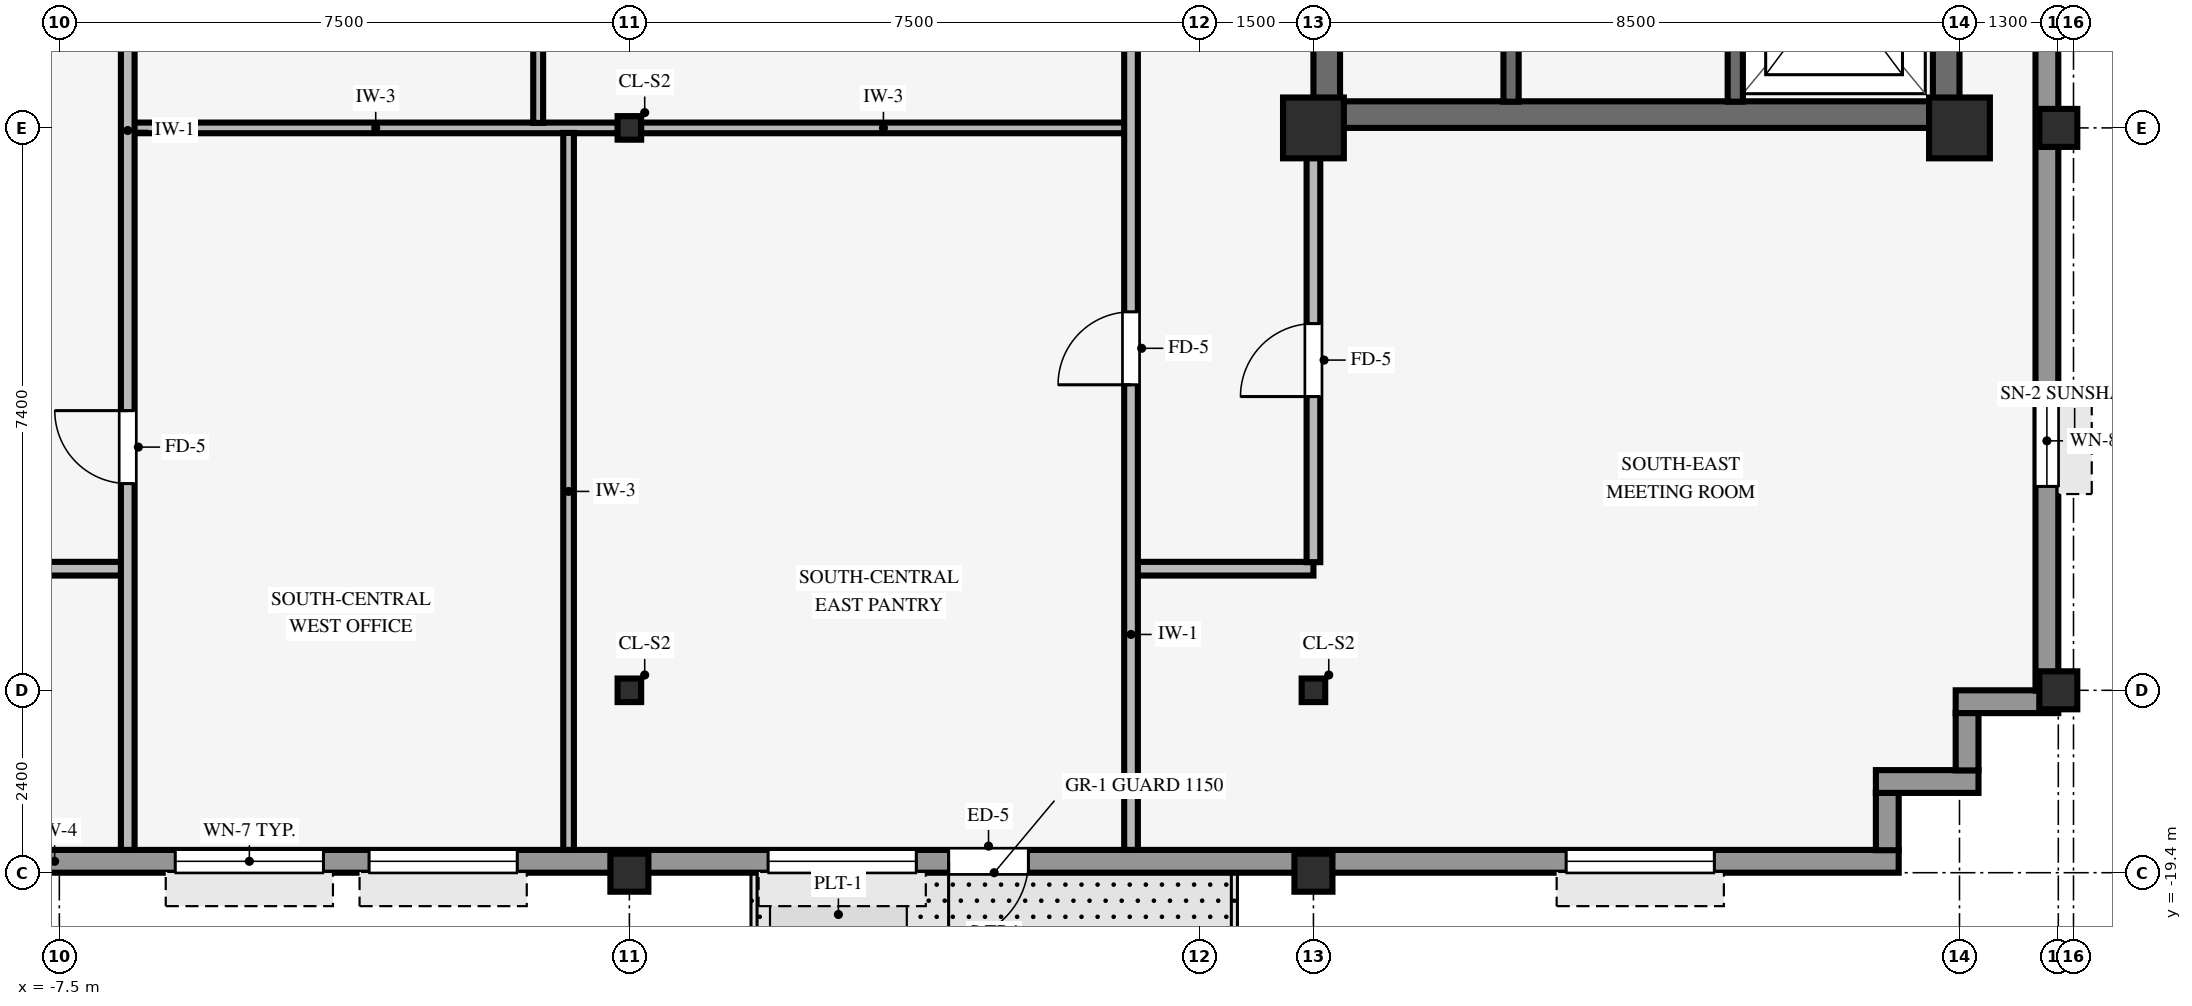
"""IFC4 building model, lengths in metres.
Left out: names, types, materials, properties, quantities, classifications, styles, units other than length and angle.
Written with IfcOpenShell. Run it as: python <this file> out.ifc"""

import sys

from ifc_helpers import new_model, si_unit, direction, frame, frame_2d, origin, origin_2d, place, context, subcontext, project, spatial, rectangle, hollow_rectangle, i_section, extrude, source, transform, mapped, element, fill, save


model = new_model("IFC4")
c1 = context("Model", 3, precision=1e-05, world=origin(), true_north=direction((0.0, 1.0)))
c2 = subcontext(c1, "Body", "Model", "MODEL_VIEW")
j1 = project(units=[si_unit("LENGTHUNIT", "METRE"), si_unit("PLANEANGLEUNIT", "RADIAN")], contexts=[c1])
p1 = place(None, origin())
s1 = spatial("IfcSite", under=j1, at=p1, CompositionType="ELEMENT")
p2 = place(p1, origin())
s2 = spatial("IfcBuilding", under=s1, at=p2, CompositionType="ELEMENT")
p3 = place(p2, frame((0.0, 0.0, 257.95)))
s3 = spatial("IfcBuildingStorey", under=s2, at=p3, CompositionType="ELEMENT", Elevation=257.95)
p4 = place(p3, frame((9.0, -9.425, 0.0), z_axis=(0.0, 0.0, 1.0), x_axis=(1.0, 0.0, 0.0)))
e1 = element("IfcWall", 1, at=p4, inside=s3, PredefinedType="SHEAR", context=c2, shape_type="SweptSolid", body=[
    extrude(rectangle(XDim=8.5, YDim=0.35, at=frame_2d((4.25, 0.0))), origin(), (0.0, 0.0, 1.0), 3.37),
])
p5 = place(p3, frame((9.175, -9.255, 0.0), z_axis=(0.0, 0.0, 1.0), x_axis=(0.0, 1.0, 0.0)))
e2 = element("IfcWall", 2, at=p5, inside=s3, PredefinedType="SHEAR", context=c2, shape_type="SweptSolid", body=[
    extrude(rectangle(XDim=18.51, YDim=0.35, at=frame_2d((9.255, 0.0))), origin(), (0.0, 0.0, 1.0), 3.37),
])
p6 = place(p5, frame((8.655, 0.0, 0.0)))
e3 = element("IfcOpeningElement", 3, at=p6, cuts=e2, PredefinedType="OPENING", context=c2, shape_type="SweptSolid", body=[
    extrude(rectangle(XDim=1.2, YDim=2.15, at=frame_2d((0.6, 1.075))), frame((0.0, 0.185, 0.0), z_axis=(0.0, -1.0, 0.0), x_axis=(1.0, 0.0, 0.0)), (0.0, 0.0, 1.0), 0.37),
])
p7 = place(p3, frame((17.325, -9.255, 0.0), z_axis=(0.0, 0.0, 1.0), x_axis=(0.0, 1.0, 0.0)))
e4 = element("IfcWall", 4, at=p7, inside=s3, PredefinedType="SHEAR", context=c2, shape_type="SweptSolid", body=[
    extrude(rectangle(XDim=18.51, YDim=0.35, at=frame_2d((9.255, 0.0))), origin(), (0.0, 0.0, 1.0), 3.37),
])
for number, where, z_axis, x_axis in (
    (5, (9.0, -9.6, 0.0), (0.0, 0.0, 1.0), (1.0, 0.0, 0.0)),
    (6, (17.5, -9.6, 0.0), (0.0, 0.0, 1.0), (1.0, 0.0, 0.0)),
):
    element("IfcColumn", number, at=place(p3, frame(where, z_axis=z_axis, x_axis=x_axis)), inside=s3, PredefinedType="COLUMN", context=c2, shape_type="SweptSolid", body=[
        extrude(rectangle(XDim=0.8, YDim=0.8, at=origin_2d()), origin(), (0.0, 0.0, 1.0), 3.37),
    ])
for number, where, z_axis, x_axis in (
    (7, (18.8, -17.0, 0.0), (0.0, 0.0, 1.0), (1.0, 0.0, 0.0)),
    (8, (18.8, -9.6, 0.0), (0.0, 0.0, 1.0), (1.0, 0.0, 0.0)),
    (9, (0.0, -19.4, 0.0), (0.0, 0.0, 1.0), (1.0, 0.0, 0.0)),
    (10, (9.0, -19.4, 0.0), (0.0, 0.0, 1.0), (1.0, 0.0, 0.0)),
):
    element("IfcColumn", number, at=place(p3, frame(where, z_axis=z_axis, x_axis=x_axis)), inside=s3, PredefinedType="COLUMN", context=c2, shape_type="SweptSolid", body=[
        extrude(hollow_rectangle(XDim=0.5, YDim=0.5, WallThickness=0.032, InnerFilletRadius=0.032, OuterFilletRadius=0.064, at=origin_2d()), origin(), (0.0, 0.0, 1.0), 3.37),
    ])
for number, where, z_axis, x_axis in (
    (11, (0.0, -17.0, 0.0), (0.0, 0.0, 1.0), (1.0, 0.0, 0.0)),
    (12, (0.0, -9.6, 0.0), (0.0, 0.0, 1.0), (1.0, 0.0, 0.0)),
    (13, (9.0, -17.0, 0.0), (0.0, 0.0, 1.0), (1.0, 0.0, 0.0)),
):
    element("IfcColumn", number, at=place(p3, frame(where, z_axis=z_axis, x_axis=x_axis)), inside=s3, PredefinedType="COLUMN", context=c2, shape_type="SweptSolid", body=[
        extrude(i_section(OverallWidth=0.31, OverallDepth=0.31, WebThickness=0.015, FlangeThickness=0.015, FilletRadius=0.015, at=origin_2d()), origin(), (0.0, 0.0, 1.0), 3.37),
    ])
p8 = place(p3, frame((-18.9, -19.25, 0.0), z_axis=(0.0, 0.0, 1.0), x_axis=(1.0, 0.0, 0.0)))
e14 = element("IfcWall", 14, at=p8, inside=s3, PredefinedType="STANDARD", context=c2, shape_type="SweptSolid", body=[
    extrude(rectangle(XDim=35.6, YDim=0.3, at=frame_2d((17.8, 0.0))), origin(), (0.0, 0.0, 1.0), 2.705),
])
p9 = place(p8, frame((24.15, 0.0, 0.0), z_axis=(0.0, 0.0, 1.0), x_axis=(-1.0, 0.0, 0.0)))
e15 = element("IfcOpeningElement", 15, at=p9, cuts=e14, PredefinedType="OPENING", context=c2, shape_type="SweptSolid", body=[
    extrude(rectangle(XDim=1.05, YDim=2.1, at=frame_2d((0.525, 1.05))), frame((0.0, 0.16, 0.0), z_axis=(0.0, -1.0, 0.0), x_axis=(1.0, 0.0, 0.0)), (0.0, 0.0, 1.0), 0.32),
])
p10 = place(p8, frame((2.425, 0.0, 0.8)))
e16 = element("IfcOpeningElement", 16, at=p10, cuts=e14, PredefinedType="OPENING", context=c2, shape_type="SweptSolid", body=[
    extrude(rectangle(XDim=1.95, YDim=1.48, at=frame_2d((0.975, 0.74))), frame((0.0, 0.16, 0.0), z_axis=(0.0, -1.0, 0.0), x_axis=(1.0, 0.0, 0.0)), (0.0, 0.0, 1.0), 0.32),
])
p11 = place(p8, frame((7.225, 0.0, 0.8)))
e17 = element("IfcOpeningElement", 17, at=p11, cuts=e14, PredefinedType="OPENING", context=c2, shape_type="SweptSolid", body=[
    extrude(rectangle(XDim=1.95, YDim=1.48, at=frame_2d((0.975, 0.74))), frame((0.0, 0.16, 0.0), z_axis=(0.0, -1.0, 0.0), x_axis=(1.0, 0.0, 0.0)), (0.0, 0.0, 1.0), 0.32),
])
p12 = place(p8, frame((12.925, 0.0, 0.8)))
e18 = element("IfcOpeningElement", 18, at=p12, cuts=e14, PredefinedType="OPENING", context=c2, shape_type="SweptSolid", body=[
    extrude(rectangle(XDim=1.95, YDim=1.48, at=frame_2d((0.975, 0.74))), frame((0.0, 0.16, 0.0), z_axis=(0.0, -1.0, 0.0), x_axis=(1.0, 0.0, 0.0)), (0.0, 0.0, 1.0), 0.32),
])
p13 = place(p8, frame((15.475, 0.0, 0.8)))
e19 = element("IfcOpeningElement", 19, at=p13, cuts=e14, PredefinedType="OPENING", context=c2, shape_type="SweptSolid", body=[
    extrude(rectangle(XDim=1.95, YDim=1.48, at=frame_2d((0.975, 0.74))), frame((0.0, 0.16, 0.0), z_axis=(0.0, -1.0, 0.0), x_axis=(1.0, 0.0, 0.0)), (0.0, 0.0, 1.0), 0.32),
])
p14 = place(p8, frame((20.725, 0.0, 0.8)))
e20 = element("IfcOpeningElement", 20, at=p14, cuts=e14, PredefinedType="OPENING", context=c2, shape_type="SweptSolid", body=[
    extrude(rectangle(XDim=1.95, YDim=1.48, at=frame_2d((0.975, 0.74))), frame((0.0, 0.16, 0.0), z_axis=(0.0, -1.0, 0.0), x_axis=(1.0, 0.0, 0.0)), (0.0, 0.0, 1.0), 0.32),
])
p15 = place(p8, frame((31.225, 0.0, 0.8)))
e21 = element("IfcOpeningElement", 21, at=p15, cuts=e14, PredefinedType="OPENING", context=c2, shape_type="SweptSolid", body=[
    extrude(rectangle(XDim=1.95, YDim=1.48, at=frame_2d((0.975, 0.74))), frame((0.0, 0.16, 0.0), z_axis=(0.0, -1.0, 0.0), x_axis=(1.0, 0.0, 0.0)), (0.0, 0.0, 1.0), 0.32),
])
p16 = place(p3, frame((16.55, -19.104, 0.0), z_axis=(0.0, 0.0, 1.0), x_axis=(0.0, 1.0, 0.0)))
e22 = element("IfcWall", 22, at=p16, inside=s3, PredefinedType="STANDARD", context=c2, shape_type="SweptSolid", body=[
    extrude(rectangle(XDim=0.758, YDim=0.3, at=frame_2d((0.379, 0.0))), origin(), (0.0, 0.0, 1.0), 2.892),
])
p17 = place(p3, frame((16.4, -18.2, 0.0), z_axis=(0.0, 0.0, 1.0), x_axis=(1.0, 0.0, 0.0)))
e23 = element("IfcWall", 23, at=p17, inside=s3, PredefinedType="STANDARD", context=c2, shape_type="SweptSolid", body=[
    extrude(rectangle(XDim=1.35, YDim=0.3, at=frame_2d((0.675, 0.0))), origin(), (0.0, 0.0, 1.0), 2.892),
])
p18 = place(p3, frame((17.6, -18.054, 0.0), z_axis=(0.0, 0.0, 1.0), x_axis=(0.0, 1.0, 0.0)))
e24 = element("IfcWall", 24, at=p18, inside=s3, PredefinedType="STANDARD", context=c2, shape_type="SweptSolid", body=[
    extrude(rectangle(XDim=0.758, YDim=0.3, at=frame_2d((0.379, 0.0))), origin(), (0.0, 0.0, 1.0), 2.892),
])
p19 = place(p3, frame((17.45, -17.15, 0.0), z_axis=(0.0, 0.0, 1.0), x_axis=(1.0, 0.0, 0.0)))
e25 = element("IfcWall", 25, at=p19, inside=s3, PredefinedType="STANDARD", context=c2, shape_type="SweptSolid", body=[
    extrude(rectangle(XDim=1.35, YDim=0.3, at=frame_2d((0.675, 0.0))), origin(), (0.0, 0.0, 1.0), 2.892),
])
p20 = place(p3, frame((18.65, -17.004, 0.0), z_axis=(0.0, 0.0, 1.0), x_axis=(0.0, 1.0, 0.0)))
e26 = element("IfcWall", 26, at=p20, inside=s3, PredefinedType="STANDARD", context=c2, shape_type="SweptSolid", body=[
    extrude(rectangle(XDim=34.008, YDim=0.3, at=frame_2d((17.004, 0.0))), origin(), (0.0, 0.0, 1.0), 2.705),
])
p21 = place(p20, frame((2.686, 0.0, 0.8)))
e27 = element("IfcOpeningElement", 27, at=p21, cuts=e26, PredefinedType="OPENING", context=c2, shape_type="SweptSolid", body=[
    extrude(rectangle(XDim=1.2, YDim=1.48, at=frame_2d((0.6, 0.74))), frame((0.0, 0.16, 0.0), z_axis=(0.0, -1.0, 0.0), x_axis=(1.0, 0.0, 0.0)), (0.0, 0.0, 1.0), 0.32),
])
p22 = place(p20, frame((30.122, 0.0, 0.8)))
e28 = element("IfcOpeningElement", 28, at=p22, cuts=e26, PredefinedType="OPENING", context=c2, shape_type="SweptSolid", body=[
    extrude(rectangle(XDim=1.2, YDim=1.48, at=frame_2d((0.6, 0.74))), frame((0.0, 0.16, 0.0), z_axis=(0.0, -1.0, 0.0), x_axis=(1.0, 0.0, 0.0)), (0.0, 0.0, 1.0), 0.32),
])
p23 = place(p3, frame((14.55, -9.255, 0.0), z_axis=(0.0, 0.0, 1.0), x_axis=(0.0, 1.0, 0.0)))
e29 = element("IfcWall", 29, at=p23, inside=s3, PredefinedType="SHEAR", context=c2, shape_type="SweptSolid", body=[
    extrude(rectangle(XDim=10.16, YDim=0.2, at=frame_2d((5.08, 0.0))), origin(), (0.0, 0.0, 1.0), 3.37),
])
p24 = place(p23, frame((6.615, 0.0, 0.0)))
e30 = element("IfcOpeningElement", 30, at=p24, cuts=e29, PredefinedType="OPENING", context=c2, shape_type="SweptSolid", body=[
    extrude(rectangle(XDim=0.88, YDim=2.1, at=frame_2d((0.44, 1.05))), frame((0.0, 0.11, 0.0), z_axis=(0.0, -1.0, 0.0), x_axis=(1.0, 0.0, 0.0)), (0.0, 0.0, 1.0), 0.22),
])
p25 = place(p23, frame((0.98, 0.0, 0.0)))
e31 = element("IfcOpeningElement", 31, at=p25, cuts=e29, PredefinedType="OPENING", context=c2, shape_type="SweptSolid", body=[
    extrude(rectangle(XDim=1.15, YDim=2.15, at=frame_2d((0.575, 1.075))), frame((0.0, 0.11, 0.0), z_axis=(0.0, -1.0, 0.0), x_axis=(1.0, 0.0, 0.0)), (0.0, 0.0, 1.0), 0.22),
])
p26 = place(p3, frame((11.6, -9.255, 0.0), z_axis=(0.0, 0.0, 1.0), x_axis=(0.0, 1.0, 0.0)))
e32 = element("IfcWall", 32, at=p26, inside=s3, PredefinedType="SHEAR", context=c2, shape_type="SweptSolid", body=[
    extrude(rectangle(XDim=8.025, YDim=0.2, at=frame_2d((4.012, 0.0))), origin(), (0.0, 0.0, 1.0), 3.37),
])
p27 = place(p26, frame((5.615, 0.0, 0.0)))
e33 = element("IfcOpeningElement", 33, at=p27, cuts=e32, PredefinedType="OPENING", context=c2, shape_type="SweptSolid", body=[
    extrude(rectangle(XDim=0.88, YDim=2.1, at=frame_2d((0.44, 1.05))), frame((0.0, 0.11, 0.0), z_axis=(0.0, -1.0, 0.0), x_axis=(1.0, 0.0, 0.0)), (0.0, 0.0, 1.0), 0.22),
])
p28 = place(p3, frame((-9.0, -15.4, 0.0), z_axis=(0.0, 0.0, 1.0), x_axis=(1.0, 0.0, 0.0)))
e34 = element("IfcWall", 34, at=p28, inside=s3, PredefinedType="PARTITIONING", context=c2, shape_type="SweptSolid", body=[
    extrude(rectangle(XDim=2.324, YDim=0.18, at=frame_2d((1.162, 0.0))), origin(), (0.0, 0.0, 1.0), 3.36),
])
p29 = place(p3, frame((6.666, -15.4, 0.0), z_axis=(0.0, 0.0, 1.0), x_axis=(1.0, 0.0, 0.0)))
e35 = element("IfcWall", 35, at=p29, inside=s3, PredefinedType="PARTITIONING", context=c2, shape_type="SweptSolid", body=[
    extrude(rectangle(XDim=2.334, YDim=0.18, at=frame_2d((1.167, 0.0))), origin(), (0.0, 0.0, 1.0), 3.36),
])
p30 = place(p3, frame((-6.524, -9.6, 0.0), z_axis=(0.0, 0.0, 1.0), x_axis=(1.0, 0.0, 0.0)))
e36 = element("IfcWall", 36, at=p30, inside=s3, PredefinedType="PARTITIONING", context=c2, shape_type="SweptSolid", body=[
    extrude(rectangle(XDim=6.373, YDim=0.14, at=frame_2d((3.187, 0.0))), origin(), (0.0, 0.0, 1.0), 2.405),
])
p31 = place(p3, frame((0.151, -9.6, 0.0), z_axis=(0.0, 0.0, 1.0), x_axis=(1.0, 0.0, 0.0)))
e37 = element("IfcWall", 37, at=p31, inside=s3, PredefinedType="PARTITIONING", context=c2, shape_type="SweptSolid", body=[
    extrude(rectangle(XDim=6.383, YDim=0.14, at=frame_2d((3.191, 0.0))), origin(), (0.0, 0.0, 1.0), 2.405),
])
p32 = place(p3, frame((-6.6, -19.1, 0.0), z_axis=(0.0, 0.0, 1.0), x_axis=(0.0, 1.0, 0.0)))
e38 = element("IfcWall", 38, at=p32, inside=s3, PredefinedType="PARTITIONING", context=c2, shape_type="SweptSolid", body=[
    extrude(rectangle(XDim=17.764, YDim=0.18, at=frame_2d((8.882, 0.0))), origin(), (0.0, 0.0, 1.0), 3.36),
])
p33 = place(p32, frame((13.152, 0.0, 0.0)))
e39 = element("IfcOpeningElement", 39, at=p33, cuts=e38, PredefinedType="OPENING", context=c2, shape_type="SweptSolid", body=[
    extrude(rectangle(XDim=0.96, YDim=2.1, at=frame_2d((0.48, 1.05))), frame((0.0, 0.1, 0.0), z_axis=(0.0, -1.0, 0.0), x_axis=(1.0, 0.0, 0.0)), (0.0, 0.0, 1.0), 0.2),
])
p34 = place(p32, frame((4.82, 0.0, 0.0)))
e40 = element("IfcOpeningElement", 40, at=p34, cuts=e38, PredefinedType="OPENING", context=c2, shape_type="SweptSolid", body=[
    extrude(rectangle(XDim=0.96, YDim=2.1, at=frame_2d((0.48, 1.05))), frame((0.0, 0.1, 0.0), z_axis=(0.0, -1.0, 0.0), x_axis=(1.0, 0.0, 0.0)), (0.0, 0.0, 1.0), 0.2),
])
p35 = place(p3, frame((-1.2, -9.534, 0.0), z_axis=(0.0, 0.0, 1.0), x_axis=(0.0, 1.0, 0.0)))
e41 = element("IfcWall", 41, at=p35, inside=s3, PredefinedType="PARTITIONING", context=c2, shape_type="SweptSolid", body=[
    extrude(rectangle(XDim=8.198, YDim=0.13, at=frame_2d((4.099, 0.0))), origin(), (0.0, 0.0, 1.0), 3.36),
])
p36 = place(p3, frame((-0.8, -19.1, 0.0), z_axis=(0.0, 0.0, 1.0), x_axis=(0.0, 1.0, 0.0)))
e42 = element("IfcWall", 42, at=p36, inside=s3, PredefinedType="PARTITIONING", context=c2, shape_type="SweptSolid", body=[
    extrude(rectangle(XDim=9.434, YDim=0.14, at=frame_2d((4.717, 0.0))), origin(), (0.0, 0.0, 1.0), 3.36),
])
p37 = place(p3, frame((6.6, -19.1, 0.0), z_axis=(0.0, 0.0, 1.0), x_axis=(0.0, 1.0, 0.0)))
e43 = element("IfcWall", 43, at=p37, inside=s3, PredefinedType="PARTITIONING", context=c2, shape_type="SweptSolid", body=[
    extrude(rectangle(XDim=17.764, YDim=0.18, at=frame_2d((8.882, 0.0))), origin(), (0.0, 0.0, 1.0), 3.36),
])
p38 = place(p37, frame((13.152, 0.0, 0.0)))
e44 = element("IfcOpeningElement", 44, at=p38, cuts=e43, PredefinedType="OPENING", context=c2, shape_type="SweptSolid", body=[
    extrude(rectangle(XDim=0.96, YDim=2.1, at=frame_2d((0.48, 1.05))), frame((0.0, 0.1, 0.0), z_axis=(0.0, -1.0, 0.0), x_axis=(1.0, 0.0, 0.0)), (0.0, 0.0, 1.0), 0.2),
])
p39 = place(p37, frame((6.12, 0.0, 0.0)))
e45 = element("IfcOpeningElement", 45, at=p39, cuts=e43, PredefinedType="OPENING", context=c2, shape_type="SweptSolid", body=[
    extrude(rectangle(XDim=0.96, YDim=2.1, at=frame_2d((0.48, 1.05))), frame((0.0, 0.1, 0.0), z_axis=(0.0, -1.0, 0.0), x_axis=(1.0, 0.0, 0.0)), (0.0, 0.0, 1.0), 0.2),
])
p40 = place(p3, frame((9.0, -15.314, 0.0), z_axis=(0.0, 0.0, 1.0), x_axis=(0.0, 1.0, 0.0)))
e46 = element("IfcWall", 46, at=p40, inside=s3, PredefinedType="PARTITIONING", context=c2, shape_type="SweptSolid", body=[
    extrude(rectangle(XDim=5.318, YDim=0.18, at=frame_2d((2.659, 0.0))), origin(), (0.0, 0.0, 1.0), 2.892),
])
p41 = place(p40, frame((2.179, 0.0, 0.0)))
e47 = element("IfcOpeningElement", 47, at=p41, cuts=e46, PredefinedType="OPENING", context=c2, shape_type="SweptSolid", body=[
    extrude(rectangle(XDim=0.96, YDim=2.1, at=frame_2d((0.48, 1.05))), frame((0.0, 0.1, 0.0), z_axis=(0.0, -1.0, 0.0), x_axis=(1.0, 0.0, 0.0)), (0.0, 0.0, 1.0), 0.2),
])
m1 = source(origin(), c2, "Body", "SweptSolid", [
    extrude(rectangle(XDim=1.05, YDim=2.1, at=frame_2d((0.525, 1.05))), frame((0.0, 0.025, 0.0), z_axis=(0.0, -1.0, 0.0), x_axis=(1.0, 0.0, 0.0)), (0.0, 0.0, 1.0), 0.05),
])
p42 = place(p9, origin())
e48 = element("IfcDoor", 48, at=p42, inside=s3, OperationType="SINGLE_SWING_RIGHT", PredefinedType="DOOR", context=c2, shape_type="MappedRepresentation", body=[
    mapped(m1, transform((0.0, 0.0, 0.0), scale=1.0)),
])
fill(e15, e48)
m2 = source(origin(), c2, "Body", "SweptSolid", [
    extrude(rectangle(XDim=1.95, YDim=1.48, at=frame_2d((0.975, 0.74))), frame((0.0, 0.03, 0.0), z_axis=(0.0, -1.0, 0.0), x_axis=(1.0, 0.0, 0.0)), (0.0, 0.0, 1.0), 0.06),
])
p43 = place(p12, origin())
e49 = element("IfcWindow", 49, at=p43, inside=s3, PartitioningType="SINGLE_PANEL", PredefinedType="WINDOW", context=c2, shape_type="MappedRepresentation", body=[
    mapped(m2, transform((0.0, 0.0, 0.0), scale=1.0)),
])
fill(e18, e49)
p44 = place(p13, origin())
e50 = element("IfcWindow", 50, at=p44, inside=s3, PartitioningType="SINGLE_PANEL", PredefinedType="WINDOW", context=c2, shape_type="MappedRepresentation", body=[
    mapped(m2, transform((0.0, 0.0, 0.0), scale=1.0)),
])
fill(e19, e50)
p45 = place(p14, origin())
e51 = element("IfcWindow", 51, at=p45, inside=s3, PartitioningType="SINGLE_PANEL", PredefinedType="WINDOW", context=c2, shape_type="MappedRepresentation", body=[
    mapped(m2, transform((0.0, 0.0, 0.0), scale=1.0)),
])
fill(e20, e51)
p46 = place(p15, origin())
e52 = element("IfcWindow", 52, at=p46, inside=s3, PartitioningType="SINGLE_PANEL", PredefinedType="WINDOW", context=c2, shape_type="MappedRepresentation", body=[
    mapped(m2, transform((0.0, 0.0, 0.0), scale=1.0)),
])
fill(e21, e52)
m3 = source(origin(), c2, "Body", "SweptSolid", [
    extrude(rectangle(XDim=1.2, YDim=1.48, at=frame_2d((0.6, 0.74))), frame((0.0, 0.03, 0.0), z_axis=(0.0, -1.0, 0.0), x_axis=(1.0, 0.0, 0.0)), (0.0, 0.0, 1.0), 0.06),
])
p47 = place(p21, origin())
e53 = element("IfcWindow", 53, at=p47, inside=s3, PartitioningType="SINGLE_PANEL", PredefinedType="WINDOW", context=c2, shape_type="MappedRepresentation", body=[
    mapped(m3, transform((0.0, 0.0, 0.0), scale=1.0)),
])
fill(e27, e53)
m4 = source(origin(), c2, "Body", "SweptSolid", [
    extrude(rectangle(XDim=0.96, YDim=2.1, at=frame_2d((0.48, 1.05))), frame((0.0, 0.025, 0.0), z_axis=(0.0, -1.0, 0.0), x_axis=(1.0, 0.0, 0.0)), (0.0, 0.0, 1.0), 0.05),
])
p48 = place(p39, origin())
e54 = element("IfcDoor", 54, at=p48, inside=s3, OperationType="SINGLE_SWING_LEFT", PredefinedType="DOOR", context=c2, shape_type="MappedRepresentation", body=[
    mapped(m4, transform((0.0, 0.0, 0.0), scale=1.0)),
])
fill(e45, e54)
p49 = place(p41, origin())
e55 = element("IfcDoor", 55, at=p49, inside=s3, OperationType="SINGLE_SWING_LEFT", PredefinedType="DOOR", context=c2, shape_type="MappedRepresentation", body=[
    mapped(m4, transform((0.0, 0.0, 0.0), scale=1.0)),
])
fill(e47, e55)
p50 = place(p34, origin())
e56 = element("IfcDoor", 56, at=p50, inside=s3, OperationType="SINGLE_SWING_RIGHT", PredefinedType="DOOR", context=c2, shape_type="MappedRepresentation", body=[
    mapped(m4, transform((0.0, 0.0, 0.0), scale=1.0)),
])
fill(e40, e56)
save(model, sys.argv[1])
